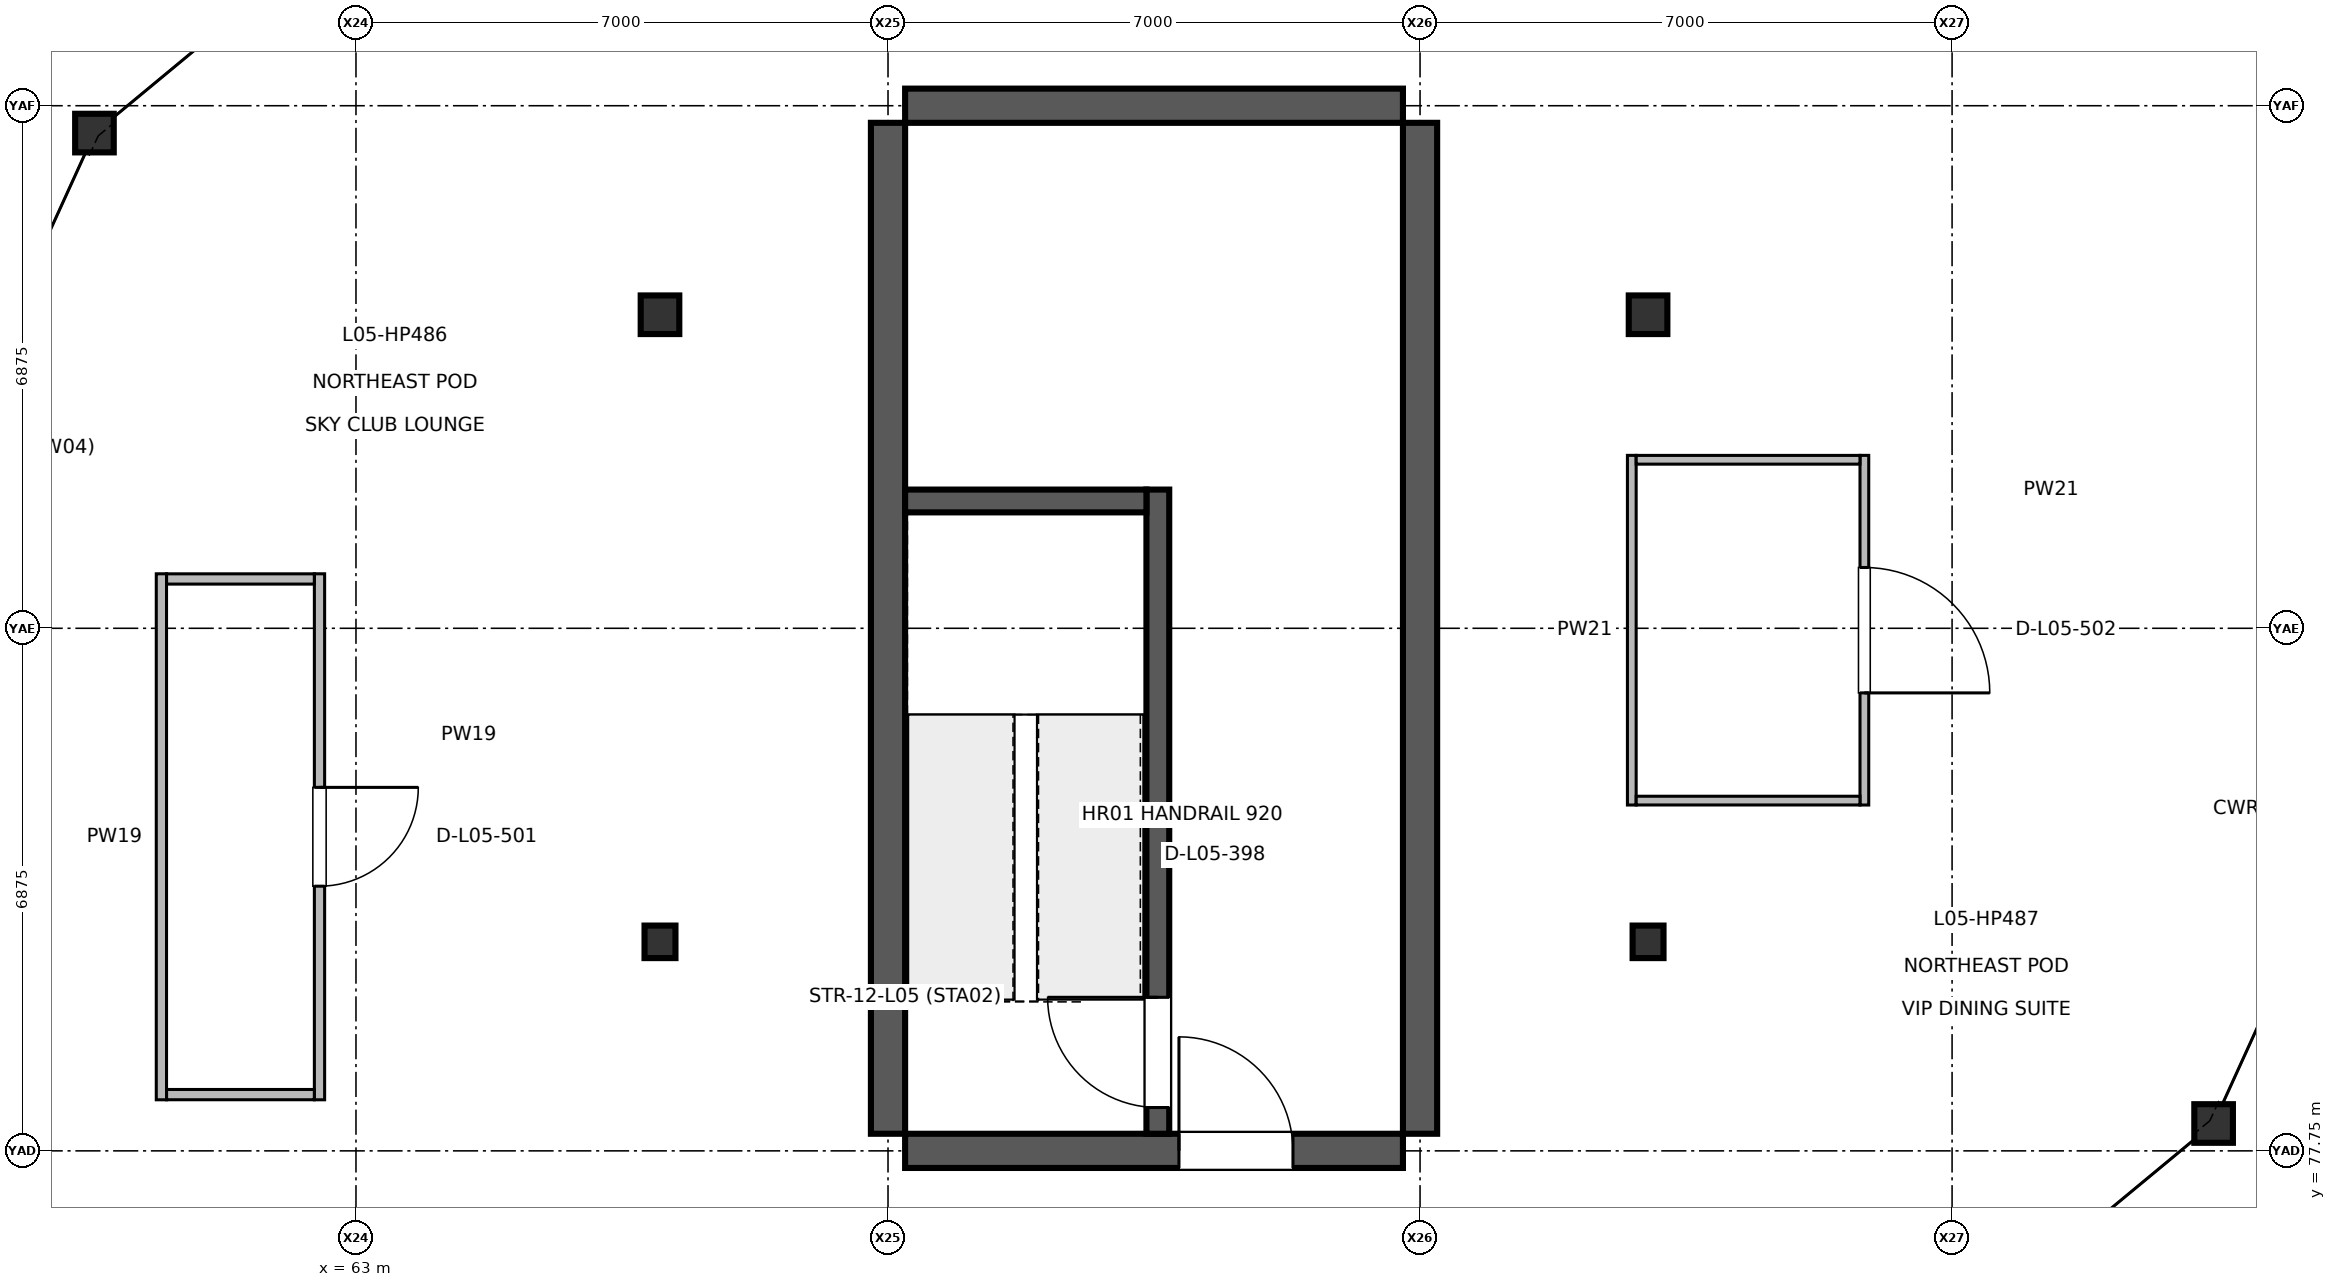
"""IFC4 building model, lengths in metres.
Left out: names, types, materials, properties, quantities, classifications, styles, units other than length and angle.
Written with IfcOpenShell. Run it as: python <this file> out.ifc"""

import sys

from ifc_helpers import new_model, si_unit, direction, frame, frame_2d, origin, origin_2d, place, context, subcontext, project, spatial, rectangle, hollow_circle, i_section, extrude, element, fill, save


model = new_model("IFC4")
c1 = context("Model", 3, precision=1e-05, world=origin(), true_north=direction((0.0, 1.0)))
c2 = subcontext(c1, "Body", "Model", "MODEL_VIEW")
j1 = project(units=[si_unit("LENGTHUNIT", "METRE"), si_unit("PLANEANGLEUNIT", "RADIAN")], contexts=[c1])
p1 = place(None, origin())
s1 = spatial("IfcSite", under=j1, at=p1, CompositionType="ELEMENT")
p2 = place(p1, origin())
s2 = spatial("IfcBuilding", under=s1, at=p2, CompositionType="ELEMENT")
p3 = place(p2, frame((0.0, 0.0, 21.0)))
s3 = spatial("IfcBuildingStorey", under=s2, at=p3, CompositionType="ELEMENT", Elevation=21.0)
for number, where, z_axis, x_axis in (
    (1, (67.0, 80.5, 0.0), (0.0, 0.0, 1.0), (1.0, 0.0, 0.0)),
    (2, (80.0, 80.5, 0.0), (0.0, 0.0, 1.0), (1.0, 0.0, 0.0)),
):
    element("IfcColumn", number, at=place(p3, frame(where, z_axis=z_axis, x_axis=x_axis)), inside=s3, PredefinedType="COLUMN", context=c2, shape_type="SweptSolid", body=[
        extrude(i_section(OverallWidth=0.407, OverallDepth=0.428, WebThickness=0.02, FlangeThickness=0.035, at=origin_2d()), origin(), (0.0, 0.0, 1.0), 5.398),
    ])
for number, where, z_axis, x_axis in (
    (3, (67.0, 88.75, 0.0), (0.0, 0.0, 1.0), (1.0, 0.0, 0.0)),
    (4, (80.0, 88.75, 0.0), (0.0, 0.0, 1.0), (1.0, 0.0, 0.0)),
    (5, (59.559, 91.14, 0.0), (0.0, 0.0, 1.0), (1.0, 0.0, 0.0)),
    (6, (87.441, 78.11, 0.0), (0.0, 0.0, 1.0), (1.0, 0.0, 0.0)),
):
    element("IfcColumn", number, at=place(p3, frame(where, z_axis=z_axis, x_axis=x_axis)), inside=s3, PredefinedType="COLUMN", context=c2, shape_type="SweptSolid", body=[
        extrude(hollow_circle(Radius=0.254, WallThickness=0.025, at=origin_2d()), origin(), (0.0, 0.0, 1.0), 5.398),
    ])
for number, where, z_axis, x_axis in (
    (7, (70.0, 77.975, 0.0), (0.0, 0.0, 1.0), (0.0, 1.0, 0.0)),
    (8, (77.0, 77.975, 0.0), (0.0, 0.0, 1.0), (0.0, 1.0, 0.0)),
):
    element("IfcWall", number, at=place(p3, frame(where, z_axis=z_axis, x_axis=x_axis)), inside=s3, PredefinedType="SHEAR", context=c2, shape_type="SweptSolid", body=[
        extrude(rectangle(XDim=13.3, YDim=0.45, at=frame_2d((6.65, 0.0))), origin(), (0.0, 0.0, 1.0), 5.15),
    ])
p4 = place(p3, frame((70.225, 77.75, 0.0), z_axis=(0.0, 0.0, 1.0), x_axis=(1.0, 0.0, 0.0)))
e9 = element("IfcWall", 9, at=p4, inside=s3, PredefinedType="SHEAR", context=c2, shape_type="SweptSolid", body=[
    extrude(rectangle(XDim=6.55, YDim=0.45, at=frame_2d((3.275, 0.0))), origin(), (0.0, 0.0, 1.0), 5.15),
])
p5 = place(p4, frame((3.603, 0.0, 0.0)))
e10 = element("IfcOpeningElement", 10, at=p5, cuts=e9, PredefinedType="OPENING", context=c2, shape_type="SweptSolid", body=[
    extrude(rectangle(XDim=1.5, YDim=2.2, at=frame_2d((0.75, 1.1))), frame((0.0, 0.235, 0.0), z_axis=(0.0, -1.0, 0.0), x_axis=(1.0, 0.0, 0.0)), (0.0, 0.0, 1.0), 0.47),
])
p6 = place(p3, frame((70.225, 91.5, 0.0), z_axis=(0.0, 0.0, 1.0), x_axis=(1.0, 0.0, 0.0)))
e11 = element("IfcWall", 11, at=p6, inside=s3, PredefinedType="SHEAR", context=c2, shape_type="SweptSolid", body=[
    extrude(rectangle(XDim=6.55, YDim=0.45, at=frame_2d((3.275, 0.0))), origin(), (0.0, 0.0, 1.0), 5.15),
])
p7 = place(p3, frame((73.55, 77.975, 0.0), z_axis=(0.0, 0.0, 1.0), x_axis=(0.0, 1.0, 0.0)))
e12 = element("IfcWall", 12, at=p7, inside=s3, PredefinedType="SHEAR", context=c2, shape_type="SweptSolid", body=[
    extrude(rectangle(XDim=8.475, YDim=0.3, at=frame_2d((4.237, 0.0))), origin(), (0.0, 0.0, 1.0), 5.15),
])
p8 = place(p7, frame((0.345, 0.0, 0.0)))
e13 = element("IfcOpeningElement", 13, at=p8, cuts=e12, PredefinedType="OPENING", context=c2, shape_type="SweptSolid", body=[
    extrude(rectangle(XDim=1.45, YDim=2.2, at=frame_2d((0.725, 1.1))), frame((0.0, 0.16, 0.0), z_axis=(0.0, -1.0, 0.0), x_axis=(1.0, 0.0, 0.0)), (0.0, 0.0, 1.0), 0.32),
])
p9 = place(p3, frame((62.52, 85.342, 0.0), z_axis=(0.0, 0.0, 1.0), x_axis=(0.0, -1.0, 0.0)))
e14 = element("IfcWall", 14, at=p9, inside=s3, PredefinedType="PARTITIONING", context=c2, shape_type="SweptSolid", body=[
    extrude(rectangle(XDim=6.92, YDim=0.135, at=frame_2d((3.46, 0.0))), origin(), (0.0, 0.0, 1.0), 4.42),
])
p10 = place(p9, frame((2.81, 0.0, 0.0)))
e15 = element("IfcOpeningElement", 15, at=p10, cuts=e14, PredefinedType="OPENING", context=c2, shape_type="SweptSolid", body=[
    extrude(rectangle(XDim=1.3, YDim=2.3, at=frame_2d((0.65, 1.15))), frame((0.0, 0.077, 0.0), z_axis=(0.0, -1.0, 0.0), x_axis=(1.0, 0.0, 0.0)), (0.0, 0.0, 1.0), 0.155),
])
p11 = place(p3, frame((82.846, 86.9, 0.0), z_axis=(0.0, 0.0, 1.0), x_axis=(0.0, -1.0, 0.0)))
e16 = element("IfcWall", 16, at=p11, inside=s3, PredefinedType="PARTITIONING", context=c2, shape_type="SweptSolid", body=[
    extrude(rectangle(XDim=4.6, YDim=0.115, at=frame_2d((2.3, 0.0))), origin(), (0.0, 0.0, 1.0), 4.42),
])
p12 = place(p11, frame((1.475, 0.0, 0.0)))
e17 = element("IfcOpeningElement", 17, at=p12, cuts=e16, PredefinedType="OPENING", context=c2, shape_type="SweptSolid", body=[
    extrude(rectangle(XDim=1.65, YDim=2.3, at=frame_2d((0.825, 1.15))), frame((0.0, 0.067, 0.0), z_axis=(0.0, -1.0, 0.0), x_axis=(1.0, 0.0, 0.0)), (0.0, 0.0, 1.0), 0.135),
])
p13 = place(p3, frame((60.44, 78.422, 0.0), z_axis=(0.0, 0.0, 1.0), x_axis=(0.0, 1.0, 0.0)))
e18 = element("IfcWall", 18, at=p13, inside=s3, PredefinedType="PARTITIONING", context=c2, shape_type="SweptSolid", body=[
    extrude(rectangle(XDim=6.92, YDim=0.135, at=frame_2d((3.46, 0.0))), origin(), (0.0, 0.0, 1.0), 4.42),
])
for number, where, z_axis, x_axis in (
    (19, (60.508, 78.49, 0.0), (0.0, 0.0, 1.0), (1.0, 0.0, 0.0)),
    (20, (60.508, 85.274, 0.0), (0.0, 0.0, 1.0), (1.0, 0.0, 0.0)),
):
    element("IfcWall", number, at=place(p3, frame(where, z_axis=z_axis, x_axis=x_axis)), inside=s3, PredefinedType="PARTITIONING", context=c2, shape_type="SweptSolid", body=[
        extrude(rectangle(XDim=1.944, YDim=0.135, at=frame_2d((0.972, 0.0))), origin(), (0.0, 0.0, 1.0), 4.42),
    ])
p14 = place(p3, frame((79.786, 82.3, 0.0), z_axis=(0.0, 0.0, 1.0), x_axis=(0.0, 1.0, 0.0)))
e21 = element("IfcWall", 21, at=p14, inside=s3, PredefinedType="PARTITIONING", context=c2, shape_type="SweptSolid", body=[
    extrude(rectangle(XDim=4.6, YDim=0.115, at=frame_2d((2.3, 0.0))), origin(), (0.0, 0.0, 1.0), 4.42),
])
for number, where, z_axis, x_axis in (
    (22, (79.844, 82.358, 0.0), (0.0, 0.0, 1.0), (1.0, 0.0, 0.0)),
    (23, (79.844, 86.842, 0.0), (0.0, 0.0, 1.0), (1.0, 0.0, 0.0)),
):
    element("IfcWall", number, at=place(p3, frame(where, z_axis=z_axis, x_axis=x_axis)), inside=s3, PredefinedType="PARTITIONING", context=c2, shape_type="SweptSolid", body=[
        extrude(rectangle(XDim=2.944, YDim=0.115, at=frame_2d((1.472, 0.0))), origin(), (0.0, 0.0, 1.0), 4.42),
    ])
p15 = place(p3, frame((70.225, 86.3, 0.0), z_axis=(0.0, 0.0, 1.0), x_axis=(1.0, 0.0, 0.0)))
e24 = element("IfcWall", 24, at=p15, inside=s3, PredefinedType="SHEAR", context=c2, shape_type="SweptSolid", body=[
    extrude(rectangle(XDim=3.175, YDim=0.3, at=frame_2d((1.587, 0.0))), origin(), (0.0, 0.0, 1.0), 5.15),
])
p16 = place(p5, origin())
e25 = element("IfcDoor", 25, at=p16, inside=s3, OperationType="SINGLE_SWING_LEFT", PredefinedType="DOOR", context=c2, shape_type="SweptSolid", body=[
    extrude(rectangle(XDim=1.5, YDim=2.2, at=frame_2d((0.75, 1.1))), frame((0.0, 0.025, 0.0), z_axis=(0.0, -1.0, 0.0), x_axis=(1.0, 0.0, 0.0)), (0.0, 0.0, 1.0), 0.05),
])
fill(e10, e25)
p17 = place(p8, origin())
e26 = element("IfcDoor", 26, at=p17, inside=s3, OperationType="SINGLE_SWING_RIGHT", PredefinedType="DOOR", context=c2, shape_type="SweptSolid", body=[
    extrude(rectangle(XDim=1.45, YDim=2.2, at=frame_2d((0.725, 1.1))), frame((0.0, 0.025, 0.0), z_axis=(0.0, -1.0, 0.0), x_axis=(1.0, 0.0, 0.0)), (0.0, 0.0, 1.0), 0.05),
])
fill(e13, e26)
p18 = place(p10, origin())
e27 = element("IfcDoor", 27, at=p18, inside=s3, OperationType="SINGLE_SWING_LEFT", PredefinedType="DOOR", context=c2, shape_type="SweptSolid", body=[
    extrude(rectangle(XDim=1.3, YDim=2.3, at=frame_2d((0.65, 1.15))), frame((0.0, 0.025, 0.0), z_axis=(0.0, -1.0, 0.0), x_axis=(1.0, 0.0, 0.0)), (0.0, 0.0, 1.0), 0.05),
])
fill(e15, e27)
p19 = place(p12, origin())
e28 = element("IfcDoor", 28, at=p19, inside=s3, OperationType="SINGLE_SWING_RIGHT", PredefinedType="DOOR", context=c2, shape_type="SweptSolid", body=[
    extrude(rectangle(XDim=1.65, YDim=2.3, at=frame_2d((0.825, 1.15))), frame((0.0, 0.025, 0.0), z_axis=(0.0, -1.0, 0.0), x_axis=(1.0, 0.0, 0.0)), (0.0, 0.0, 1.0), 0.05),
])
fill(e17, e28)
save(model, sys.argv[1])
